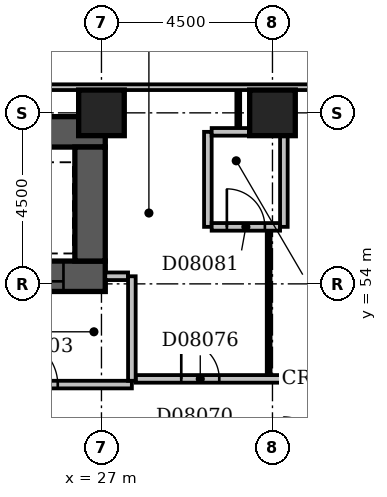
"""IFC4 building model, lengths in metres.
Left out: names, types, materials, properties, quantities, classifications, styles, units other than length and angle.
Written with IfcOpenShell. Run it as: python <this file> out.ifc"""

import sys

from ifc_helpers import new_model, si_unit, direction, frame, frame_2d, origin, origin_2d, place, context, subcontext, project, spatial, rectangle, extrude, element, fill, save


model = new_model("IFC4")
c1 = context("Model", 3, precision=1e-05, world=origin(), true_north=direction((0.0, 1.0)))
c2 = subcontext(c1, "Body", "Model", "MODEL_VIEW")
j1 = project(units=[si_unit("LENGTHUNIT", "METRE"), si_unit("PLANEANGLEUNIT", "RADIAN")], contexts=[c1])
p1 = place(None, origin())
s1 = spatial("IfcSite", under=j1, at=p1, CompositionType="ELEMENT")
p2 = place(p1, origin())
s2 = spatial("IfcBuilding", under=s1, at=p2, CompositionType="ELEMENT")
p3 = place(p2, frame((0.0, 0.0, 39.8)))
s3 = spatial("IfcBuildingStorey", under=s2, at=p3, CompositionType="ELEMENT", Elevation=39.8)
p4 = place(p3, frame((23.8, 54.2, -0.3), z_axis=(0.0, 0.0, 1.0), x_axis=(1.0, 0.0, 0.0)))
e1 = element("IfcWall", 1, at=p4, inside=s3, PredefinedType="SHEAR", context=c2, shape_type="SweptSolid", body=[
    extrude(rectangle(XDim=3.3, YDim=0.8, at=frame_2d((1.65, 0.0))), origin(), (0.0, 0.0, 1.0), 3.6),
])
p5 = place(p4, frame((1.1, 0.0, 0.3)))
e2 = element("IfcOpeningElement", 2, at=p5, cuts=e1, PredefinedType="OPENING", context=c2, shape_type="SweptSolid", body=[
    extrude(rectangle(XDim=1.1, YDim=2.1, at=frame_2d((0.55, 1.05))), frame((0.0, 0.412, 0.0), z_axis=(0.0, -1.0, 0.0), x_axis=(1.0, 0.0, 0.0)), (0.0, 0.0, 1.0), 0.824),
])
p6 = place(p3, frame((23.8, 58.0, -0.3), z_axis=(0.0, 0.0, 1.0), x_axis=(1.0, 0.0, 0.0)))
e3 = element("IfcWall", 3, at=p6, inside=s3, PredefinedType="SHEAR", context=c2, shape_type="SweptSolid", body=[
    extrude(rectangle(XDim=3.3, YDim=0.8, at=frame_2d((1.65, 0.0))), origin(), (0.0, 0.0, 1.0), 3.6),
])
p7 = place(p3, frame((26.7, 54.6, -0.3), z_axis=(0.0, 0.0, 1.0), x_axis=(0.0, 1.0, 0.0)))
e4 = element("IfcWall", 4, at=p7, inside=s3, PredefinedType="SHEAR", context=c2, shape_type="SweptSolid", body=[
    extrude(rectangle(XDim=3.0, YDim=0.8, at=frame_2d((1.5, 0.0))), origin(), (0.0, 0.0, 1.0), 3.6),
])
for number, where, z_axis, x_axis in (
    (5, (27.0, 58.5, -0.3), (0.0, 0.0, 1.0), (1.0, 0.0, 0.0)),
    (6, (31.5, 58.5, -0.3), (0.0, 0.0, 1.0), (1.0, 0.0, 0.0)),
):
    element("IfcColumn", number, at=place(p3, frame(where, z_axis=z_axis, x_axis=x_axis)), inside=s3, PredefinedType="COLUMN", context=c2, shape_type="SweptSolid", body=[
        extrude(rectangle(XDim=1.2, YDim=1.2, at=origin_2d()), origin(), (0.0, 0.0, 1.0), 3.6),
    ])
p8 = place(p3, frame((68.1, 59.175, 0.0), z_axis=(0.0, 0.0, 1.0), x_axis=(-1.0, 0.0, 0.0)))
e7 = element("IfcWall", 7, at=p8, inside=s3, PredefinedType="STANDARD", context=c2, shape_type="SweptSolid", body=[
    extrude(rectangle(XDim=68.85, YDim=0.15, at=frame_2d((34.425, 0.0))), origin(), (0.0, 0.0, 1.0), 2.7),
])
p9 = place(p8, frame((1.65, 0.0, 0.6)))
e8 = element("IfcOpeningElement", 8, at=p9, cuts=e7, PredefinedType="OPENING", context=c2, shape_type="SweptSolid", body=[
    extrude(rectangle(XDim=2.4, YDim=1.8, at=frame_2d((1.2, 0.9))), frame((0.0, 0.087, 0.0), z_axis=(0.0, -1.0, 0.0), x_axis=(1.0, 0.0, 0.0)), (0.0, 0.0, 1.0), 0.174),
])
p10 = place(p8, frame((7.17, 0.0, 0.6)))
e9 = element("IfcOpeningElement", 9, at=p10, cuts=e7, PredefinedType="OPENING", context=c2, shape_type="SweptSolid", body=[
    extrude(rectangle(XDim=1.5, YDim=1.8, at=frame_2d((0.75, 0.9))), frame((0.0, 0.087, 0.0), z_axis=(0.0, -1.0, 0.0), x_axis=(1.0, 0.0, 0.0)), (0.0, 0.0, 1.0), 0.174),
])
p11 = place(p3, frame((23.0, 51.35, 0.0), z_axis=(0.0, 0.0, 1.0), x_axis=(1.0, 0.0, 0.0)))
e10 = element("IfcWall", 10, at=p11, inside=s3, PredefinedType="PARTITIONING", context=c2, shape_type="SweptSolid", body=[
    extrude(rectangle(XDim=4.8, YDim=0.2, at=frame_2d((2.4, 0.0))), origin(), (0.0, 0.0, 1.0), 3.3),
])
p12 = place(p11, frame((1.65, 0.0, 0.0)))
e11 = element("IfcOpeningElement", 11, at=p12, cuts=e10, PredefinedType="OPENING", context=c2, shape_type="SweptSolid", body=[
    extrude(rectangle(XDim=1.2, YDim=2.1, at=frame_2d((0.6, 1.05))), frame((0.0, 0.112, 0.0), z_axis=(0.0, -1.0, 0.0), x_axis=(1.0, 0.0, 0.0)), (0.0, 0.0, 1.0), 0.224),
])
p13 = place(p3, frame((27.8, 51.45, 0.0), z_axis=(0.0, 0.0, 1.0), x_axis=(0.0, 1.0, 0.0)))
e12 = element("IfcWall", 12, at=p13, inside=s3, PredefinedType="PARTITIONING", context=c2, shape_type="SweptSolid", body=[
    extrude(rectangle(XDim=2.75, YDim=0.2, at=frame_2d((1.375, 0.0))), origin(), (0.0, 0.0, 1.0), 3.3),
])
p14 = place(p3, frame((27.1, 54.2, 0.0), z_axis=(0.0, 0.0, 1.0), x_axis=(1.0, 0.0, 0.0)))
e13 = element("IfcWall", 13, at=p14, inside=s3, PredefinedType="PARTITIONING", context=c2, shape_type="SweptSolid", body=[
    extrude(rectangle(XDim=0.6, YDim=0.2, at=frame_2d((0.3, 0.0))), origin(), (0.0, 0.0, 1.0), 3.3),
])
p15 = place(p3, frame((27.9, 51.5, 0.0), z_axis=(0.0, 0.0, 1.0), x_axis=(1.0, 0.0, 0.0)))
e14 = element("IfcWall", 14, at=p15, inside=s3, PredefinedType="PARTITIONING", context=c2, shape_type="SweptSolid", body=[
    extrude(rectangle(XDim=9.3, YDim=0.2, at=frame_2d((4.65, 0.0))), origin(), (0.0, 0.0, 1.0), 3.3),
])
p16 = place(p15, frame((1.2, 0.0, 0.0)))
e15 = element("IfcOpeningElement", 15, at=p16, cuts=e14, PredefinedType="OPENING", context=c2, shape_type="SweptSolid", body=[
    extrude(rectangle(XDim=1.0, YDim=2.1, at=frame_2d((0.5, 1.05))), frame((0.0, 0.112, 0.0), z_axis=(0.0, -1.0, 0.0), x_axis=(1.0, 0.0, 0.0)), (0.0, 0.0, 1.0), 0.224),
])
p17 = place(p15, frame((6.0, 0.0, 0.0)))
e16 = element("IfcOpeningElement", 16, at=p17, cuts=e14, PredefinedType="OPENING", context=c2, shape_type="SweptSolid", body=[
    extrude(rectangle(XDim=0.9, YDim=2.1, at=frame_2d((0.45, 1.05))), frame((0.0, 0.112, 0.0), z_axis=(0.0, -1.0, 0.0), x_axis=(1.0, 0.0, 0.0)), (0.0, 0.0, 1.0), 0.224),
])
p18 = place(p3, frame((31.4, 51.6, 0.0), z_axis=(0.0, 0.0, 1.0), x_axis=(0.0, 1.0, 0.0)))
e17 = element("IfcWall", 17, at=p18, inside=s3, PredefinedType="PARTITIONING", context=c2, shape_type="SweptSolid", body=[
    extrude(rectangle(XDim=3.8, YDim=0.1, at=frame_2d((1.9, 0.0))), origin(), (0.0, 0.0, 1.0), 3.3),
])
p19 = place(p3, frame((29.8, 55.5, 0.0), z_axis=(0.0, 0.0, 1.0), x_axis=(0.0, 1.0, 0.0)))
e18 = element("IfcWall", 18, at=p19, inside=s3, PredefinedType="PARTITIONING", context=c2, shape_type="SweptSolid", body=[
    extrude(rectangle(XDim=2.5, YDim=0.2, at=frame_2d((1.25, 0.0))), origin(), (0.0, 0.0, 1.0), 3.3),
])
p20 = place(p3, frame((29.9, 55.5, 0.0), z_axis=(0.0, 0.0, 1.0), x_axis=(1.0, 0.0, 0.0)))
e19 = element("IfcWall", 19, at=p20, inside=s3, PredefinedType="PARTITIONING", context=c2, shape_type="SweptSolid", body=[
    extrude(rectangle(XDim=1.8, YDim=0.2, at=frame_2d((0.9, 0.0))), origin(), (0.0, 0.0, 1.0), 3.3),
])
p21 = place(p20, frame((0.4, 0.0, 0.0)))
e20 = element("IfcOpeningElement", 20, at=p21, cuts=e19, PredefinedType="OPENING", context=c2, shape_type="SweptSolid", body=[
    extrude(rectangle(XDim=1.0, YDim=2.1, at=frame_2d((0.5, 1.05))), frame((0.0, 0.112, 0.0), z_axis=(0.0, -1.0, 0.0), x_axis=(1.0, 0.0, 0.0)), (0.0, 0.0, 1.0), 0.224),
])
p22 = place(p3, frame((31.8, 55.5, 0.0), z_axis=(0.0, 0.0, 1.0), x_axis=(0.0, 1.0, 0.0)))
e21 = element("IfcWall", 21, at=p22, inside=s3, PredefinedType="PARTITIONING", context=c2, shape_type="SweptSolid", body=[
    extrude(rectangle(XDim=2.5, YDim=0.2, at=frame_2d((1.25, 0.0))), origin(), (0.0, 0.0, 1.0), 3.3),
])
p23 = place(p3, frame((29.9, 58.0, 0.0), z_axis=(0.0, 0.0, 1.0), x_axis=(1.0, 0.0, 0.0)))
e22 = element("IfcWall", 22, at=p23, inside=s3, PredefinedType="PARTITIONING", context=c2, shape_type="SweptSolid", body=[
    extrude(rectangle(XDim=1.8, YDim=0.2, at=frame_2d((0.9, 0.0))), origin(), (0.0, 0.0, 1.0), 3.3),
])
p24 = place(p3, frame((30.6, 58.1, 0.0), z_axis=(0.0, 0.0, 1.0), x_axis=(0.0, 1.0, 0.0)))
e23 = element("IfcWall", 23, at=p24, inside=s3, PredefinedType="PARTITIONING", context=c2, shape_type="SweptSolid", body=[
    extrude(rectangle(XDim=1.0, YDim=0.1, at=frame_2d((0.5, 0.0))), origin(), (0.0, 0.0, 1.0), 3.3),
])
p25 = place(p12, origin())
e24 = element("IfcDoor", 24, at=p25, inside=s3, OperationType="SINGLE_SWING_LEFT", PredefinedType="DOOR", context=c2, shape_type="SweptSolid", body=[
    extrude(rectangle(XDim=1.2, YDim=2.1, at=frame_2d((0.6, 1.05))), frame((0.0, 0.025, 0.0), z_axis=(0.0, -1.0, 0.0), x_axis=(1.0, 0.0, 0.0)), (0.0, 0.0, 1.0), 0.05),
])
fill(e11, e24)
p26 = place(p5, origin())
e25 = element("IfcDoor", 25, at=p26, inside=s3, OperationType="SLIDING_TO_LEFT", PredefinedType="DOOR", context=c2, shape_type="SweptSolid", body=[
    extrude(rectangle(XDim=1.1, YDim=2.1, at=frame_2d((0.55, 1.05))), frame((0.0, 0.025, 0.0), z_axis=(0.0, -1.0, 0.0), x_axis=(1.0, 0.0, 0.0)), (0.0, 0.0, 1.0), 0.05),
])
fill(e2, e25)
p27 = place(p16, origin())
e26 = element("IfcDoor", 26, at=p27, inside=s3, OperationType="SINGLE_SWING_LEFT", PredefinedType="DOOR", context=c2, shape_type="SweptSolid", body=[
    extrude(rectangle(XDim=1.0, YDim=2.1, at=frame_2d((0.5, 1.05))), frame((0.0, 0.025, 0.0), z_axis=(0.0, -1.0, 0.0), x_axis=(1.0, 0.0, 0.0)), (0.0, 0.0, 1.0), 0.05),
])
fill(e15, e26)
p28 = place(p21, origin())
e27 = element("IfcDoor", 27, at=p28, inside=s3, OperationType="SINGLE_SWING_LEFT", PredefinedType="DOOR", context=c2, shape_type="SweptSolid", body=[
    extrude(rectangle(XDim=1.0, YDim=2.1, at=frame_2d((0.5, 1.05))), frame((0.0, 0.025, 0.0), z_axis=(0.0, -1.0, 0.0), x_axis=(1.0, 0.0, 0.0)), (0.0, 0.0, 1.0), 0.05),
])
fill(e20, e27)
save(model, sys.argv[1])
